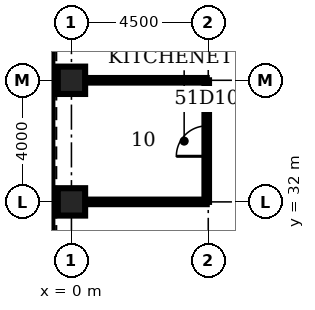
"""IFC4 building model, lengths in metres.
Left out: names, types, materials, properties, quantities, classifications, styles, units other than length and angle.
Written with IfcOpenShell. Run it as: python <this file> out.ifc"""

import sys

from ifc_helpers import new_model, si_unit, direction, frame, frame_2d, origin, origin_2d, place, context, subcontext, project, spatial, rectangle, hollow_rectangle, extrude, element, fill, save


model = new_model("IFC4")
c1 = context("Model", 3, precision=1e-05, world=origin(), true_north=direction((0.0, 1.0)))
c2 = subcontext(c1, "Body", "Model", "MODEL_VIEW")
j1 = project(units=[si_unit("LENGTHUNIT", "METRE"), si_unit("PLANEANGLEUNIT", "RADIAN")], contexts=[c1])
p1 = place(None, origin())
s1 = spatial("IfcSite", under=j1, at=p1, CompositionType="ELEMENT")
p2 = place(p1, origin())
s2 = spatial("IfcBuilding", under=s1, at=p2, CompositionType="ELEMENT")
p3 = place(p2, frame((0.0, 0.0, 227.8)))
s3 = spatial("IfcBuildingStorey", under=s2, at=p3, CompositionType="ELEMENT", Elevation=227.8)
for number, where, z_axis, x_axis in (
    (1, (0.0, 36.0, 0.0), (0.0, 0.0, 1.0), (1.0, 0.0, 0.0)),
    (2, (0.0, 32.0, 0.0), (0.0, 0.0, 1.0), (1.0, 0.0, 0.0)),
):
    element("IfcColumn", number, at=place(p3, frame(where, z_axis=z_axis, x_axis=x_axis)), inside=s3, PredefinedType="COLUMN", context=c2, shape_type="SweptSolid", body=[
        extrude(hollow_rectangle(XDim=0.9, YDim=0.9, WallThickness=0.08, at=origin_2d()), origin(), (0.0, 0.0, 1.0), 4.2),
    ])
for number, where, z_axis, x_axis in (
    (3, (0.45, 32.0, 0.0), (0.0, 0.0, 1.0), (1.0, 0.0, 0.0)),
    (4, (0.45, 36.0, 0.0), (0.0, 0.0, 1.0), (1.0, 0.0, 0.0)),
):
    element("IfcWall", number, at=place(p3, frame(where, z_axis=z_axis, x_axis=x_axis)), inside=s3, PredefinedType="PARTITIONING", context=c2, shape_type="SweptSolid", body=[
        extrude(rectangle(XDim=4.0, YDim=0.15, at=frame_2d((2.0, 0.0))), origin(), (0.0, 0.0, 1.0), 3.0),
    ])
p4 = place(p3, frame((4.45, 32.0, 0.0), z_axis=(0.0, 0.0, 1.0), x_axis=(0.0, 1.0, 0.0)))
e5 = element("IfcWall", 5, at=p4, inside=s3, PredefinedType="PARTITIONING", context=c2, shape_type="SweptSolid", body=[
    extrude(rectangle(XDim=4.0, YDim=0.15, at=frame_2d((2.0, 0.0))), origin(), (0.0, 0.0, 1.0), 3.0),
])
p5 = place(p4, frame((1.5, 0.0, 0.0)))
e6 = element("IfcOpeningElement", 6, at=p5, cuts=e5, PredefinedType="OPENING", context=c2, shape_type="SweptSolid", body=[
    extrude(rectangle(XDim=1.0, YDim=2.1, at=frame_2d((0.5, 1.05))), frame((0.0, 0.085, 0.0), z_axis=(0.0, -1.0, 0.0), x_axis=(1.0, 0.0, 0.0)), (0.0, 0.0, 1.0), 0.17),
])
p6 = place(p5, origin())
e7 = element("IfcDoor", 7, at=p6, inside=s3, OperationType="SINGLE_SWING_LEFT", PredefinedType="DOOR", context=c2, shape_type="SweptSolid", body=[
    extrude(rectangle(XDim=1.0, YDim=2.1, at=frame_2d((0.5, 1.05))), frame((0.0, 0.025, 0.0), z_axis=(0.0, -1.0, 0.0), x_axis=(1.0, 0.0, 0.0)), (0.0, 0.0, 1.0), 0.05),
])
fill(e6, e7)
save(model, sys.argv[1])
